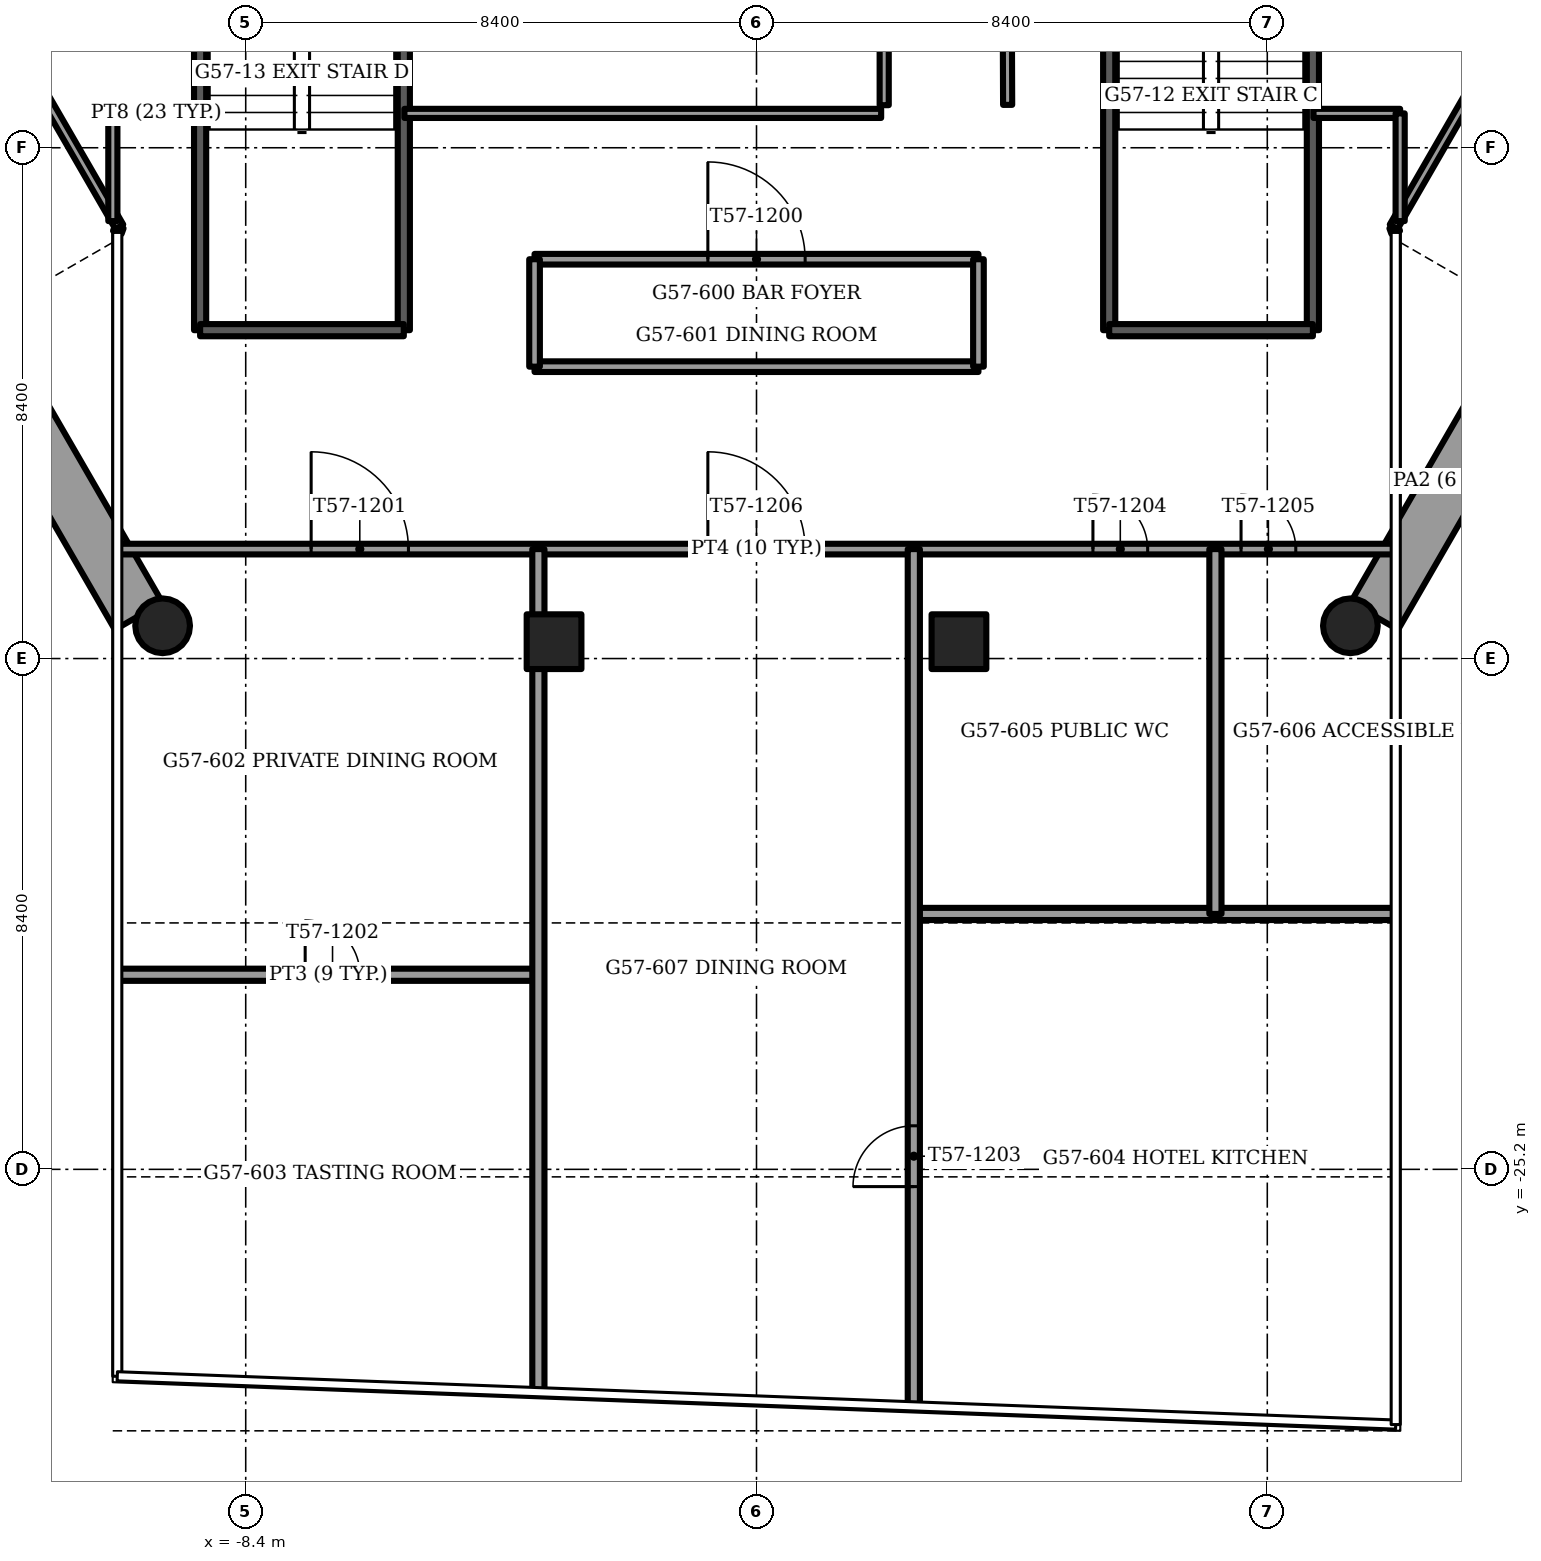
"""IFC4 building model, lengths in metres.
Left out: names, types, materials, properties, quantities, classifications, styles, units other than length and angle.
Written with IfcOpenShell. Run it as: python <this file> out.ifc"""

import sys

from ifc_helpers import new_model, si_unit, direction, frame, frame_2d, origin, origin_2d, place, context, subcontext, project, spatial, rectangle, circle, extrude, element, fill, save


model = new_model("IFC4")
c1 = context("Model", 3, precision=1e-05, world=origin(), true_north=direction((0.0, 1.0)))
c2 = subcontext(c1, "Body", "Model", "MODEL_VIEW")
j1 = project(units=[si_unit("LENGTHUNIT", "METRE"), si_unit("PLANEANGLEUNIT", "RADIAN")], contexts=[c1])
p1 = place(None, origin())
s1 = spatial("IfcSite", under=j1, at=p1, CompositionType="ELEMENT")
p2 = place(p1, origin())
s2 = spatial("IfcBuilding", under=s1, at=p2, CompositionType="ELEMENT")
p3 = place(p2, frame((0.0, 0.0, 229.5)))
s3 = spatial("IfcBuildingStorey", under=s2, at=p3, CompositionType="ELEMENT", Elevation=229.5)
for number, where, z_axis, x_axis in (
    (1, (-9.767, -16.261, -1.2), (0.0, 0.0, 1.0), (1.0, 0.0, 0.0)),
    (2, (9.767, -16.261, -1.2), (0.0, 0.0, 1.0), (1.0, 0.0, 0.0)),
):
    element("IfcColumn", number, at=place(p3, frame(where, z_axis=z_axis, x_axis=x_axis)), inside=s3, PredefinedType="COLUMN", context=c2, shape_type="SweptSolid", body=[
        extrude(circle(Radius=0.45, at=origin_2d()), origin(), (0.0, 0.0, 1.0), 3.75),
    ])
for number, where, z_axis, x_axis in (
    (3, (-3.329, -16.523, -1.2), (0.0, 0.0, 1.0), (-1.0, 0.0, 0.0)),
    (4, (3.329, -16.523, -1.2), (0.0, 0.0, 1.0), (-1.0, 0.0, 0.0)),
):
    element("IfcColumn", number, at=place(p3, frame(where, z_axis=z_axis, x_axis=x_axis)), inside=s3, PredefinedType="COLUMN", context=c2, shape_type="SweptSolid", body=[
        extrude(rectangle(XDim=0.9, YDim=0.9, at=origin_2d()), origin(), (0.0, 0.0, 1.0), 3.75),
    ])
for number, where, z_axis, x_axis in (
    (5, (-12.718, -11.672, 0.0), (0.0, 0.0, 1.0), (0.5, -0.866, 0.0)),
    (6, (10.161, -16.101, 0.0), (0.0, 0.0, 1.0), (0.5, 0.866, 0.0)),
):
    element("IfcWall", number, at=place(p3, frame(where, z_axis=z_axis, x_axis=x_axis)), inside=s3, PredefinedType="PARAPET", context=c2, shape_type="SweptSolid", body=[
        extrude(rectangle(XDim=5.114, YDim=0.9, at=frame_2d((2.557, 0.0))), origin(), (0.0, 0.0, 1.0), 1.1),
    ])
p4 = place(p3, frame((-15.583, -0.86, 0.0), z_axis=(0.0, 0.0, 1.0), x_axis=(0.499995050918, -0.866028261119, 0.0)))
e7 = element("IfcWall", 7, at=p4, inside=s3, PredefinedType="SOLIDWALL", context=c2, shape_type="SweptSolid", body=[
    extrude(rectangle(XDim=10.208, YDim=0.15, at=frame_2d((5.104, 0.0))), origin(), (0.0, 0.0, 1.0), 3.45),
])
p5 = place(p4, frame((3.994, 0.0, 0.15)))
e8 = element("IfcOpeningElement", 8, at=p5, cuts=e7, PredefinedType="OPENING", context=c2, shape_type="SweptSolid", body=[
    extrude(rectangle(XDim=0.9, YDim=2.2, at=frame_2d((0.45, 1.1))), frame((0.0, 0.075, 0.0), z_axis=(0.0, -1.0, 0.0), x_axis=(1.0, 0.0, 0.0)), (0.0, 0.0, 1.0), 0.15),
])
p6 = place(p4, frame((5.347, 0.0, 0.15)))
e9 = element("IfcOpeningElement", 9, at=p6, cuts=e7, PredefinedType="OPENING", context=c2, shape_type="SweptSolid", body=[
    extrude(rectangle(XDim=1.4, YDim=2.2, at=frame_2d((0.7, 1.1))), frame((0.0, 0.075, 0.0), z_axis=(0.0, -1.0, 0.0), x_axis=(1.0, 0.0, 0.0)), (0.0, 0.0, 1.0), 0.15),
])
p7 = place(p3, frame((10.479, -9.7, 0.0), z_axis=(0.0, 0.0, 1.0), x_axis=(0.499995050918, 0.866028261119, 0.0)))
e10 = element("IfcWall", 10, at=p7, inside=s3, PredefinedType="SOLIDWALL", context=c2, shape_type="SweptSolid", body=[
    extrude(rectangle(XDim=10.208, YDim=0.15, at=frame_2d((5.104, 0.0))), origin(), (0.0, 0.0, 1.0), 3.45),
])
p8 = place(p7, frame((3.461, 0.0, 0.15)))
e11 = element("IfcOpeningElement", 11, at=p8, cuts=e10, PredefinedType="OPENING", context=c2, shape_type="SweptSolid", body=[
    extrude(rectangle(XDim=0.9, YDim=2.2, at=frame_2d((0.45, 1.1))), frame((0.0, 0.075, 0.0), z_axis=(0.0, -1.0, 0.0), x_axis=(1.0, 0.0, 0.0)), (0.0, 0.0, 1.0), 0.15),
])
p9 = place(p7, frame((4.814, 0.0, 0.15)))
e12 = element("IfcOpeningElement", 12, at=p9, cuts=e10, PredefinedType="OPENING", context=c2, shape_type="SweptSolid", body=[
    extrude(rectangle(XDim=1.4, YDim=2.2, at=frame_2d((0.7, 1.1))), frame((0.0, 0.075, 0.0), z_axis=(0.0, -1.0, 0.0), x_axis=(1.0, 0.0, 0.0)), (0.0, 0.0, 1.0), 0.15),
])
for number, where, z_axis, x_axis in (
    (13, (-10.479, -9.7, 0.0), (0.0, 0.0, 1.0), (-0.339, -0.941, 0.0)),
    (14, (10.479, -9.7, 0.0), (0.0, 0.0, 1.0), (0.339, -0.941, 0.0)),
):
    element("IfcWall", number, at=place(p3, frame(where, z_axis=z_axis, x_axis=x_axis)), inside=s3, PredefinedType="SOLIDWALL", context=c2, shape_type="SweptSolid", body=[
        extrude(rectangle(XDim=0.098, YDim=0.15, at=frame_2d((0.049, 0.0))), origin(), (0.0, 0.0, 1.0), 3.45),
    ])
for number, where, z_axis, x_axis in (
    (15, (5.8, -3.7, -0.3), (0.0, 0.0, 1.0), (0.0, -1.0, 0.0)),
    (16, (9.15, -3.7, -0.3), (0.0, 0.0, 1.0), (0.0, -1.0, 0.0)),
):
    element("IfcWall", number, at=place(p3, frame(where, z_axis=z_axis, x_axis=x_axis)), inside=s3, PredefinedType="SOLIDWALL", context=c2, shape_type="SweptSolid", body=[
        extrude(rectangle(XDim=7.7, YDim=0.2, at=frame_2d((3.85, 0.0))), origin(), (0.0, 0.0, 1.0), 3.75),
    ])
p10 = place(p3, frame((5.8, -11.4, -0.3), z_axis=(0.0, 0.0, 1.0), x_axis=(1.0, 0.0, 0.0)))
e17 = element("IfcWall", 17, at=p10, inside=s3, PredefinedType="SOLIDWALL", context=c2, shape_type="SweptSolid", body=[
    extrude(rectangle(XDim=3.35, YDim=0.2, at=frame_2d((1.675, 0.0))), origin(), (0.0, 0.0, 1.0), 3.75),
])
for number, where, z_axis, x_axis in (
    (18, (-9.15, -3.7, -0.3), (0.0, 0.0, 1.0), (0.0, -1.0, 0.0)),
    (19, (-5.8, -3.7, -0.3), (0.0, 0.0, 1.0), (0.0, -1.0, 0.0)),
):
    element("IfcWall", number, at=place(p3, frame(where, z_axis=z_axis, x_axis=x_axis)), inside=s3, PredefinedType="SOLIDWALL", context=c2, shape_type="SweptSolid", body=[
        extrude(rectangle(XDim=7.7, YDim=0.2, at=frame_2d((3.85, 0.0))), origin(), (0.0, 0.0, 1.0), 3.75),
    ])
p11 = place(p3, frame((-9.15, -11.4, -0.3), z_axis=(0.0, 0.0, 1.0), x_axis=(1.0, 0.0, 0.0)))
e20 = element("IfcWall", 20, at=p11, inside=s3, PredefinedType="SOLIDWALL", context=c2, shape_type="SweptSolid", body=[
    extrude(rectangle(XDim=3.35, YDim=0.2, at=frame_2d((1.675, 0.0))), origin(), (0.0, 0.0, 1.0), 3.75),
])
p12 = place(p3, frame((-10.585, -7.835, 0.0), z_axis=(0.0, 0.0, 1.0), x_axis=(1.0, 0.0, 0.0)))
e21 = element("IfcWall", 21, at=p12, inside=s3, PredefinedType="PARTITIONING", context=c2, shape_type="SweptSolid", body=[
    extrude(rectangle(XDim=1.425, YDim=0.15, at=frame_2d((0.712, 0.0))), origin(), (0.0, 0.0, 1.0), 3.45),
])
p13 = place(p3, frame((-5.79, -7.835, 0.0), z_axis=(0.0, 0.0, 1.0), x_axis=(1.0, 0.0, 0.0)))
e22 = element("IfcWall", 22, at=p13, inside=s3, PredefinedType="PARTITIONING", context=c2, shape_type="SweptSolid", body=[
    extrude(rectangle(XDim=7.84, YDim=0.15, at=frame_2d((3.92, 0.0))), origin(), (0.0, 0.0, 1.0), 3.45),
])
p14 = place(p3, frame((9.16, -7.835, 0.0), z_axis=(0.0, 0.0, 1.0), x_axis=(1.0, 0.0, 0.0)))
e23 = element("IfcWall", 23, at=p14, inside=s3, PredefinedType="PARTITIONING", context=c2, shape_type="SweptSolid", body=[
    extrude(rectangle(XDim=1.425, YDim=0.15, at=frame_2d((0.712, 0.0))), origin(), (0.0, 0.0, 1.0), 3.45),
])
p15 = place(p3, frame((10.585, -9.606, 0.0), z_axis=(0.0, 0.0, 1.0), x_axis=(0.0, 1.0, 0.0)))
e24 = element("IfcWall", 24, at=p15, inside=s3, PredefinedType="PARTITIONING", context=c2, shape_type="SweptSolid", body=[
    extrude(rectangle(XDim=1.771, YDim=0.15, at=frame_2d((0.885, 0.0))), origin(), (0.0, 0.0, 1.0), 3.45),
])
p16 = place(p3, frame((2.1, -7.7, 0.0), z_axis=(0.0, 0.0, 1.0), x_axis=(0.0, 1.0, 0.0)))
e25 = element("IfcWall", 25, at=p16, inside=s3, PredefinedType="PARTITIONING", context=c2, shape_type="SweptSolid", body=[
    extrude(rectangle(XDim=4.0, YDim=0.15, at=frame_2d((2.0, 0.0))), origin(), (0.0, 0.0, 1.0), 3.45),
])
p17 = place(p3, frame((-10.585, -9.606, 0.0), z_axis=(0.0, 0.0, 1.0), x_axis=(0.0, 1.0, 0.0)))
e26 = element("IfcWall", 26, at=p17, inside=s3, PredefinedType="PARTITIONING", context=c2, shape_type="SweptSolid", body=[
    extrude(rectangle(XDim=1.771, YDim=0.15, at=frame_2d((0.885, 0.0))), origin(), (0.0, 0.0, 1.0), 3.45),
])
p18 = place(p3, frame((4.13, -7.695, 0.0), z_axis=(0.0, 0.0, 1.0), x_axis=(-0.003727669041, 0.999993052218, 0.0)))
e27 = element("IfcWall", 27, at=p18, inside=s3, PredefinedType="PARTITIONING", context=c2, shape_type="SweptSolid", body=[
    extrude(rectangle(XDim=3.995, YDim=0.15, at=frame_2d((1.998, 0.0))), origin(), (0.0, 0.0, 1.0), 3.45),
])
p19 = place(p3, frame((-10.493, -15.0, 0.0), z_axis=(0.0, 0.0, 1.0), x_axis=(1.0, 0.0, 0.0)))
e28 = element("IfcWall", 28, at=p19, inside=s3, PredefinedType="PARTITIONING", context=c2, shape_type="SweptSolid", body=[
    extrude(rectangle(XDim=20.986, YDim=0.175, at=frame_2d((10.493, 0.0))), origin(), (0.0, 0.0, 1.0), 3.45),
])
p20 = place(p19, frame((3.169, 0.0, 0.0)))
e29 = element("IfcOpeningElement", 29, at=p20, cuts=e28, PredefinedType="OPENING", context=c2, shape_type="SweptSolid", body=[
    extrude(rectangle(XDim=1.6, YDim=2.1, at=frame_2d((0.8, 1.05))), frame((0.0, 0.087, 0.0), z_axis=(0.0, -1.0, 0.0), x_axis=(1.0, 0.0, 0.0)), (0.0, 0.0, 1.0), 0.175),
])
p21 = place(p19, frame((16.026, 0.0, 0.0)))
e30 = element("IfcOpeningElement", 30, at=p21, cuts=e28, PredefinedType="OPENING", context=c2, shape_type="SweptSolid", body=[
    extrude(rectangle(XDim=0.9, YDim=2.1, at=frame_2d((0.45, 1.05))), frame((0.0, 0.087, 0.0), z_axis=(0.0, -1.0, 0.0), x_axis=(1.0, 0.0, 0.0)), (0.0, 0.0, 1.0), 0.175),
])
p22 = place(p19, frame((18.462, 0.0, 0.0)))
e31 = element("IfcOpeningElement", 31, at=p22, cuts=e28, PredefinedType="OPENING", context=c2, shape_type="SweptSolid", body=[
    extrude(rectangle(XDim=0.9, YDim=2.1, at=frame_2d((0.45, 1.05))), frame((0.0, 0.087, 0.0), z_axis=(0.0, -1.0, 0.0), x_axis=(1.0, 0.0, 0.0)), (0.0, 0.0, 1.0), 0.175),
])
p23 = place(p19, frame((9.693, 0.0, 0.0)))
e32 = element("IfcOpeningElement", 32, at=p23, cuts=e28, PredefinedType="OPENING", context=c2, shape_type="SweptSolid", body=[
    extrude(rectangle(XDim=1.6, YDim=2.1, at=frame_2d((0.8, 1.05))), frame((0.0, 0.087, 0.0), z_axis=(0.0, -1.0, 0.0), x_axis=(1.0, 0.0, 0.0)), (0.0, 0.0, 1.0), 0.175),
])
p24 = place(p3, frame((-3.65, -12.0, 0.0), z_axis=(0.0, 0.0, 1.0), x_axis=(1.0, 0.0, 0.0)))
e33 = element("IfcWall", 33, at=p24, inside=s3, PredefinedType="PARTITIONING", context=c2, shape_type="SweptSolid", body=[
    extrude(rectangle(XDim=7.3, YDim=0.175, at=frame_2d((3.65, 0.0))), origin(), (0.0, 0.0, 1.0), 3.45),
])
p25 = place(p3, frame((-3.65, -10.233, 0.0), z_axis=(0.0, 0.0, 1.0), x_axis=(1.0, 0.0, 0.0)))
e34 = element("IfcWall", 34, at=p25, inside=s3, PredefinedType="PARTITIONING", context=c2, shape_type="SweptSolid", body=[
    extrude(rectangle(XDim=7.3, YDim=0.175, at=frame_2d((3.65, 0.0))), origin(), (0.0, 0.0, 1.0), 3.45),
])
p26 = place(p25, frame((2.85, 0.0, 0.0)))
e35 = element("IfcOpeningElement", 35, at=p26, cuts=e34, PredefinedType="OPENING", context=c2, shape_type="SweptSolid", body=[
    extrude(rectangle(XDim=1.6, YDim=2.1, at=frame_2d((0.8, 1.05))), frame((0.0, 0.087, 0.0), z_axis=(0.0, -1.0, 0.0), x_axis=(1.0, 0.0, 0.0)), (0.0, 0.0, 1.0), 0.175),
])
for number, where, z_axis, x_axis in (
    (36, (-3.65, -12.0, 0.0), (0.0, 0.0, 1.0), (0.0, 1.0, 0.0)),
    (37, (3.65, -12.0, 0.0), (0.0, 0.0, 1.0), (0.0, 1.0, 0.0)),
):
    element("IfcWall", number, at=place(p3, frame(where, z_axis=z_axis, x_axis=x_axis)), inside=s3, PredefinedType="PARTITIONING", context=c2, shape_type="SweptSolid", body=[
        extrude(rectangle(XDim=1.767, YDim=0.175, at=frame_2d((0.883, 0.0))), origin(), (0.0, 0.0, 1.0), 3.45),
    ])
p27 = place(p3, frame((-10.493, -22.0, 0.0), z_axis=(0.0, 0.0, 1.0), x_axis=(1.0, 0.0, 0.0)))
e38 = element("IfcWall", 38, at=p27, inside=s3, PredefinedType="PARTITIONING", context=c2, shape_type="SweptSolid", body=[
    extrude(rectangle(XDim=6.906, YDim=0.2, at=frame_2d((3.453, 0.0))), origin(), (0.0, 0.0, 1.0), 3.45),
])
p28 = place(p27, frame((3.071, 0.0, 0.0)))
e39 = element("IfcOpeningElement", 39, at=p28, cuts=e38, PredefinedType="OPENING", context=c2, shape_type="SweptSolid", body=[
    extrude(rectangle(XDim=0.9, YDim=2.1, at=frame_2d((0.45, 1.05))), frame((0.0, 0.1, 0.0), z_axis=(0.0, -1.0, 0.0), x_axis=(1.0, 0.0, 0.0)), (0.0, 0.0, 1.0), 0.2),
])
p29 = place(p3, frame((2.587, -21.0, 0.0), z_axis=(0.0, 0.0, 1.0), x_axis=(1.0, 0.0, 0.0)))
e40 = element("IfcWall", 40, at=p29, inside=s3, PredefinedType="PARTITIONING", context=c2, shape_type="SweptSolid", body=[
    extrude(rectangle(XDim=7.906, YDim=0.2, at=frame_2d((3.953, 0.0))), origin(), (0.0, 0.0, 1.0), 2.839),
])
p30 = place(p3, frame((-3.587, -28.845, 0.0), z_axis=(0.0, 0.0, 1.0), x_axis=(0.0, 1.0, 0.0)))
e41 = element("IfcWall", 41, at=p30, inside=s3, PredefinedType="PARTITIONING", context=c2, shape_type="SweptSolid", body=[
    extrude(rectangle(XDim=13.845, YDim=0.2, at=frame_2d((6.923, 0.0))), origin(), (0.0, 0.0, 1.0), 2.839),
])
p31 = place(p3, frame((2.587, -29.079, 0.0), z_axis=(0.0, 0.0, 1.0), x_axis=(0.0, 1.0, 0.0)))
e42 = element("IfcWall", 42, at=p31, inside=s3, PredefinedType="PARTITIONING", context=c2, shape_type="SweptSolid", body=[
    extrude(rectangle(XDim=14.079, YDim=0.2, at=frame_2d((7.039, 0.0))), origin(), (0.0, 0.0, 1.0), 2.839),
])
p32 = place(p31, frame((3.595, 0.0, 0.0)))
e43 = element("IfcOpeningElement", 43, at=p32, cuts=e42, PredefinedType="OPENING", context=c2, shape_type="SweptSolid", body=[
    extrude(rectangle(XDim=1.0, YDim=2.1, at=frame_2d((0.5, 1.05))), frame((0.0, 0.1, 0.0), z_axis=(0.0, -1.0, 0.0), x_axis=(1.0, 0.0, 0.0)), (0.0, 0.0, 1.0), 0.2),
])
p33 = place(p3, frame((7.547, -21.0, 0.0), z_axis=(0.0, 0.0, 1.0), x_axis=(0.0, 1.0, 0.0)))
e44 = element("IfcWall", 44, at=p33, inside=s3, PredefinedType="PARTITIONING", context=c2, shape_type="SweptSolid", body=[
    extrude(rectangle(XDim=6.0, YDim=0.2, at=frame_2d((3.0, 0.0))), origin(), (0.0, 0.0, 1.0), 3.45),
])
p34 = place(p26, origin())
e45 = element("IfcDoor", 45, at=p34, inside=s3, OperationType="DOUBLE_DOOR_SINGLE_SWING", PredefinedType="DOOR", context=c2, shape_type="SweptSolid", body=[
    extrude(rectangle(XDim=1.6, YDim=2.1, at=frame_2d((0.8, 1.05))), frame((0.0, 0.025, 0.0), z_axis=(0.0, -1.0, 0.0), x_axis=(1.0, 0.0, 0.0)), (0.0, 0.0, 1.0), 0.05),
])
fill(e35, e45)
p35 = place(p20, origin())
e46 = element("IfcDoor", 46, at=p35, inside=s3, OperationType="DOUBLE_DOOR_SINGLE_SWING", PredefinedType="DOOR", context=c2, shape_type="SweptSolid", body=[
    extrude(rectangle(XDim=1.6, YDim=2.1, at=frame_2d((0.8, 1.05))), frame((0.0, 0.025, 0.0), z_axis=(0.0, -1.0, 0.0), x_axis=(1.0, 0.0, 0.0)), (0.0, 0.0, 1.0), 0.05),
])
fill(e29, e46)
p36 = place(p28, origin())
e47 = element("IfcDoor", 47, at=p36, inside=s3, OperationType="SINGLE_SWING_RIGHT", PredefinedType="DOOR", context=c2, shape_type="SweptSolid", body=[
    extrude(rectangle(XDim=0.9, YDim=2.1, at=frame_2d((0.45, 1.05))), frame((0.0, 0.025, 0.0), z_axis=(0.0, -1.0, 0.0), x_axis=(1.0, 0.0, 0.0)), (0.0, 0.0, 1.0), 0.05),
])
fill(e39, e47)
p37 = place(p32, origin())
e48 = element("IfcDoor", 48, at=p37, inside=s3, OperationType="SINGLE_SWING_LEFT", PredefinedType="DOOR", context=c2, shape_type="SweptSolid", body=[
    extrude(rectangle(XDim=1.0, YDim=2.1, at=frame_2d((0.5, 1.05))), frame((0.0, 0.025, 0.0), z_axis=(0.0, -1.0, 0.0), x_axis=(1.0, 0.0, 0.0)), (0.0, 0.0, 1.0), 0.05),
])
fill(e43, e48)
p38 = place(p21, origin())
e49 = element("IfcDoor", 49, at=p38, inside=s3, OperationType="SINGLE_SWING_RIGHT", PredefinedType="DOOR", context=c2, shape_type="SweptSolid", body=[
    extrude(rectangle(XDim=0.9, YDim=2.1, at=frame_2d((0.45, 1.05))), frame((0.0, 0.025, 0.0), z_axis=(0.0, -1.0, 0.0), x_axis=(1.0, 0.0, 0.0)), (0.0, 0.0, 1.0), 0.05),
])
fill(e30, e49)
p39 = place(p22, origin())
e50 = element("IfcDoor", 50, at=p39, inside=s3, OperationType="SINGLE_SWING_LEFT", PredefinedType="DOOR", context=c2, shape_type="SweptSolid", body=[
    extrude(rectangle(XDim=0.9, YDim=2.1, at=frame_2d((0.45, 1.05))), frame((0.0, 0.025, 0.0), z_axis=(0.0, -1.0, 0.0), x_axis=(1.0, 0.0, 0.0)), (0.0, 0.0, 1.0), 0.05),
])
fill(e31, e50)
p40 = place(p23, origin())
e51 = element("IfcDoor", 51, at=p40, inside=s3, OperationType="DOUBLE_DOOR_SINGLE_SWING", PredefinedType="DOOR", context=c2, shape_type="SweptSolid", body=[
    extrude(rectangle(XDim=1.6, YDim=2.1, at=frame_2d((0.8, 1.05))), frame((0.0, 0.025, 0.0), z_axis=(0.0, -1.0, 0.0), x_axis=(1.0, 0.0, 0.0)), (0.0, 0.0, 1.0), 0.05),
])
fill(e32, e51)
save(model, sys.argv[1])
